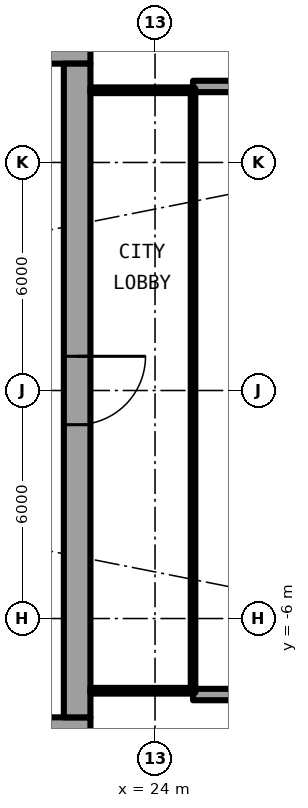
"""IFC4 building model, lengths in metres.
Left out: names, types, materials, properties, quantities, classifications, styles, units other than length and angle.
Written with IfcOpenShell. Run it as: python <this file> out.ifc"""

import sys

from ifc_helpers import new_model, si_unit, direction, frame, frame_2d, origin, place, context, subcontext, project, spatial, rectangle, extrude, element, fill, save


model = new_model("IFC4")
c1 = context("Model", 3, precision=1e-05, world=origin(), true_north=direction((0.0, 1.0)))
c2 = subcontext(c1, "Body", "Model", "MODEL_VIEW")
j1 = project(units=[si_unit("LENGTHUNIT", "METRE"), si_unit("PLANEANGLEUNIT", "RADIAN")], contexts=[c1])
p1 = place(None, origin())
s1 = spatial("IfcSite", under=j1, at=p1, CompositionType="ELEMENT")
p2 = place(p1, origin())
s2 = spatial("IfcBuilding", under=s1, at=p2, CompositionType="ELEMENT")
p3 = place(p2, frame((0.0, 0.0, 72.75)))
s3 = spatial("IfcBuildingStorey", under=s2, at=p3, CompositionType="ELEMENT", Elevation=72.75)
for number, where, z_axis, x_axis in (
    (1, (25.0, 8.0, 0.0), (0.0, 0.0, 1.0), (1.0, 0.0, 0.0)),
    (2, (25.0, -8.0, 0.0), (0.0, 0.0, 1.0), (1.0, 0.0, 0.0)),
):
    element("IfcWall", number, at=place(p3, frame(where, z_axis=z_axis, x_axis=x_axis)), inside=s3, PredefinedType="SOLIDWALL", context=c2, shape_type="SweptSolid", body=[
        extrude(rectangle(XDim=2.667, YDim=0.3, at=frame_2d((1.333, 0.0))), origin(), (0.0, 0.0, 1.0), 2.7),
    ])
p4 = place(p3, frame((22.3, 8.95, 0.0), z_axis=(0.0, 0.0, 1.0), x_axis=(-1.0, 0.0, 0.0)))
e3 = element("IfcWall", 3, at=p4, inside=s3, PredefinedType="SHEAR", context=c2, shape_type="SweptSolid", body=[
    extrude(rectangle(XDim=14.0, YDim=0.7, at=frame_2d((7.0, 0.0))), origin(), (0.0, 0.0, 1.0), 3.05),
])
p5 = place(p4, frame((1.225, 0.0, 0.0)))
e4 = element("IfcOpeningElement", 4, at=p5, cuts=e3, PredefinedType="OPENING", context=c2, shape_type="SweptSolid", body=[
    extrude(rectangle(XDim=1.2, YDim=2.3, at=frame_2d((0.6, 1.15))), frame((0.0, 0.36, 0.0), z_axis=(0.0, -1.0, 0.0), x_axis=(1.0, 0.0, 0.0)), (0.0, 0.0, 1.0), 0.72),
])
p6 = place(p3, frame((8.3, -8.95, 0.0), z_axis=(0.0, 0.0, 1.0), x_axis=(1.0, 0.0, 0.0)))
e5 = element("IfcWall", 5, at=p6, inside=s3, PredefinedType="SHEAR", context=c2, shape_type="SweptSolid", body=[
    extrude(rectangle(XDim=14.0, YDim=0.7, at=frame_2d((7.0, 0.0))), origin(), (0.0, 0.0, 1.0), 3.05),
])
p7 = place(p6, frame((11.575, 0.0, 0.0)))
e6 = element("IfcOpeningElement", 6, at=p7, cuts=e5, PredefinedType="OPENING", context=c2, shape_type="SweptSolid", body=[
    extrude(rectangle(XDim=1.2, YDim=2.3, at=frame_2d((0.6, 1.15))), frame((0.0, 0.36, 0.0), z_axis=(0.0, -1.0, 0.0), x_axis=(1.0, 0.0, 0.0)), (0.0, 0.0, 1.0), 0.72),
])
p8 = place(p3, frame((21.95, 8.6, 0.0), z_axis=(0.0, 0.0, 1.0), x_axis=(0.0, -1.0, 0.0)))
e7 = element("IfcWall", 7, at=p8, inside=s3, PredefinedType="SHEAR", context=c2, shape_type="SweptSolid", body=[
    extrude(rectangle(XDim=17.2, YDim=0.7, at=frame_2d((8.6, 0.0))), origin(), (0.0, 0.0, 1.0), 3.05),
])
p9 = place(p8, frame((7.7, 0.0, 0.0)))
e8 = element("IfcOpeningElement", 8, at=p9, cuts=e7, PredefinedType="OPENING", context=c2, shape_type="SweptSolid", body=[
    extrude(rectangle(XDim=1.8, YDim=2.3, at=frame_2d((0.9, 1.15))), frame((0.0, 0.36, 0.0), z_axis=(0.0, -1.0, 0.0), x_axis=(1.0, 0.0, 0.0)), (0.0, 0.0, 1.0), 0.72),
])
for number, where, z_axis, x_axis in (
    (9, (22.3, -7.9, 0.0), (0.0, 0.0, 1.0), (1.0, 0.0, 0.0)),
    (10, (22.3, 7.9, 0.0), (0.0, 0.0, 1.0), (1.0, 0.0, 0.0)),
):
    element("IfcWall", number, at=place(p3, frame(where, z_axis=z_axis, x_axis=x_axis)), inside=s3, PredefinedType="PARTITIONING", context=c2, shape_type="SweptSolid", body=[
        extrude(rectangle(XDim=2.64, YDim=0.15, at=frame_2d((1.32, 0.0))), origin(), (0.0, 0.0, 1.0), 2.7),
    ])
p10 = place(p3, frame((25.0, -7.95, 0.0), z_axis=(0.0, 0.0, 1.0), x_axis=(0.0, 1.0, 0.0)))
e11 = element("IfcWall", 11, at=p10, inside=s3, PredefinedType="PARTITIONING", context=c2, shape_type="SweptSolid", body=[
    extrude(rectangle(XDim=15.9, YDim=0.12, at=frame_2d((7.95, 0.0))), origin(), (0.0, 0.0, 1.0), 2.7),
])
p11 = place(p10, frame((0.95, 0.0, 0.1)))
e12 = element("IfcOpeningElement", 12, at=p11, cuts=e11, PredefinedType="OPENING", context=c2, shape_type="SweptSolid", body=[
    extrude(rectangle(XDim=14.0, YDim=2.35, at=frame_2d((7.0, 1.175))), frame((0.0, 0.07, 0.0), z_axis=(0.0, -1.0, 0.0), x_axis=(1.0, 0.0, 0.0)), (0.0, 0.0, 1.0), 0.14),
])
p12 = place(p9, origin())
e13 = element("IfcDoor", 13, at=p12, inside=s3, OperationType="SINGLE_SWING_LEFT", PredefinedType="DOOR", context=c2, shape_type="SweptSolid", body=[
    extrude(rectangle(XDim=1.8, YDim=2.3, at=frame_2d((0.9, 1.15))), frame((0.0, 0.025, 0.0), z_axis=(0.0, -1.0, 0.0), x_axis=(1.0, 0.0, 0.0)), (0.0, 0.0, 1.0), 0.05),
])
fill(e8, e13)
p13 = place(p11, origin())
e14 = element("IfcWindow", 14, at=p13, inside=s3, PartitioningType="SINGLE_PANEL", PredefinedType="WINDOW", context=c2, shape_type="SweptSolid", body=[
    extrude(rectangle(XDim=14.0, YDim=2.35, at=frame_2d((7.0, 1.175))), frame((0.0, 0.03, 0.0), z_axis=(0.0, -1.0, 0.0), x_axis=(1.0, 0.0, 0.0)), (0.0, 0.0, 1.0), 0.06),
])
fill(e12, e14)
save(model, sys.argv[1])
